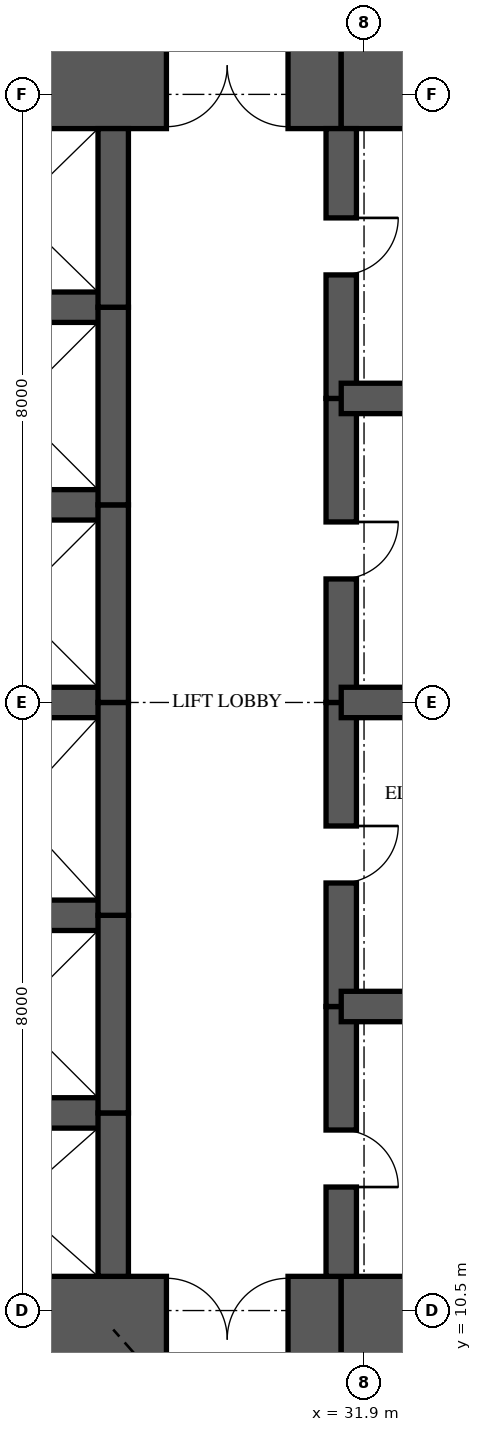
"""IFC4 building model, lengths in metres.
Left out: names, types, materials, properties, quantities, classifications, styles, units other than length and angle.
Written with IfcOpenShell. Run it as: python <this file> out.ifc"""

import sys

from ifc_helpers import new_model, si_unit, direction, frame, frame_2d, origin, place, context, subcontext, project, spatial, rectangle, extrude, element, fill, save


model = new_model("IFC4")
c1 = context("Model", 3, precision=1e-05, world=origin(), true_north=direction((0.0, 1.0)))
c2 = subcontext(c1, "Body", "Model", "MODEL_VIEW")
j1 = project(units=[si_unit("LENGTHUNIT", "METRE"), si_unit("PLANEANGLEUNIT", "RADIAN")], contexts=[c1])
p1 = place(None, origin())
s1 = spatial("IfcSite", under=j1, at=p1, CompositionType="ELEMENT")
p2 = place(p1, origin())
s2 = spatial("IfcBuilding", under=s1, at=p2, CompositionType="ELEMENT")
p3 = place(p2, frame((0.0, 0.0, 74.75)))
s3 = spatial("IfcBuildingStorey", under=s2, at=p3, CompositionType="ELEMENT", Elevation=74.75)
p4 = place(p3, frame((26.0, 10.125, 0.0), z_axis=(0.0, 0.0, 1.0), x_axis=(1.0, 0.0, 0.0)))
e1 = element("IfcWall", 1, at=p4, inside=s3, PredefinedType="SHEAR", context=c2, shape_type="SweptSolid", body=[
    extrude(rectangle(XDim=5.6, YDim=1.65, at=frame_2d((2.8, 0.0))), origin(), (0.0, 0.0, 1.0), 5.0),
])
p5 = place(p4, frame((3.3, 0.0, 0.0)))
e2 = element("IfcOpeningElement", 2, at=p5, cuts=e1, PredefinedType="OPENING", context=c2, shape_type="SweptSolid", body=[
    extrude(rectangle(XDim=1.6, YDim=2.1, at=frame_2d((0.8, 1.05))), frame((0.0, 0.835, 0.0), z_axis=(0.0, -1.0, 0.0), x_axis=(1.0, 0.0, 0.0)), (0.0, 0.0, 1.0), 1.67),
])
for number, where, z_axis, x_axis in (
    (3, (31.6, 10.125, 0.0), (0.0, 0.0, 1.0), (1.0, 0.0, 0.0)),
    (4, (35.9, 26.875, 0.0), (0.0, 0.0, 1.0), (-1.0, 0.0, 0.0)),
):
    element("IfcWall", number, at=place(p3, frame(where, z_axis=z_axis, x_axis=x_axis)), inside=s3, PredefinedType="SHEAR", context=c2, shape_type="SweptSolid", body=[
        extrude(rectangle(XDim=4.3, YDim=1.65, at=frame_2d((2.15, 0.0))), origin(), (0.0, 0.0, 1.0), 5.0),
    ])
p6 = place(p3, frame((31.6, 26.875, 0.0), z_axis=(0.0, 0.0, 1.0), x_axis=(-1.0, 0.0, 0.0)))
e5 = element("IfcWall", 5, at=p6, inside=s3, PredefinedType="SHEAR", context=c2, shape_type="SweptSolid", body=[
    extrude(rectangle(XDim=5.6, YDim=1.65, at=frame_2d((2.8, 0.0))), origin(), (0.0, 0.0, 1.0), 5.0),
])
p7 = place(p6, frame((0.7, 0.0, 0.0)))
e6 = element("IfcOpeningElement", 6, at=p7, cuts=e5, PredefinedType="OPENING", context=c2, shape_type="SweptSolid", body=[
    extrude(rectangle(XDim=1.6, YDim=2.1, at=frame_2d((0.8, 1.05))), frame((0.0, 0.835, 0.0), z_axis=(0.0, -1.0, 0.0), x_axis=(1.0, 0.0, 0.0)), (0.0, 0.0, 1.0), 1.67),
])
p8 = place(p3, frame((28.6, 10.95, 0.0), z_axis=(0.0, 0.0, 1.0), x_axis=(0.0, 1.0, 0.0)))
e7 = element("IfcWall", 7, at=p8, inside=s3, PredefinedType="SHEAR", context=c2, shape_type="SweptSolid", body=[
    extrude(rectangle(XDim=2.15, YDim=0.4, at=frame_2d((1.075, 0.0))), origin(), (0.0, 0.0, 1.0), 5.0),
])
p9 = place(p3, frame((28.6, 13.1, 0.0), z_axis=(0.0, 0.0, 1.0), x_axis=(0.0, 1.0, 0.0)))
e8 = element("IfcWall", 8, at=p9, inside=s3, PredefinedType="SHEAR", context=c2, shape_type="SweptSolid", body=[
    extrude(rectangle(XDim=2.6, YDim=0.4, at=frame_2d((1.3, 0.0))), origin(), (0.0, 0.0, 1.0), 5.0),
])
p10 = place(p3, frame((28.6, 15.7, 0.0), z_axis=(0.0, 0.0, 1.0), x_axis=(0.0, 1.0, 0.0)))
e9 = element("IfcWall", 9, at=p10, inside=s3, PredefinedType="SHEAR", context=c2, shape_type="SweptSolid", body=[
    extrude(rectangle(XDim=2.8, YDim=0.4, at=frame_2d((1.4, 0.0))), origin(), (0.0, 0.0, 1.0), 5.0),
])
p11 = place(p3, frame((28.6, 18.5, 0.0), z_axis=(0.0, 0.0, 1.0), x_axis=(0.0, 1.0, 0.0)))
e10 = element("IfcWall", 10, at=p11, inside=s3, PredefinedType="SHEAR", context=c2, shape_type="SweptSolid", body=[
    extrude(rectangle(XDim=2.6, YDim=0.4, at=frame_2d((1.3, 0.0))), origin(), (0.0, 0.0, 1.0), 5.0),
])
p12 = place(p3, frame((28.6, 21.1, 0.0), z_axis=(0.0, 0.0, 1.0), x_axis=(0.0, 1.0, 0.0)))
e11 = element("IfcWall", 11, at=p12, inside=s3, PredefinedType="SHEAR", context=c2, shape_type="SweptSolid", body=[
    extrude(rectangle(XDim=2.6, YDim=0.4, at=frame_2d((1.3, 0.0))), origin(), (0.0, 0.0, 1.0), 5.0),
])
p13 = place(p3, frame((28.6, 23.7, 0.0), z_axis=(0.0, 0.0, 1.0), x_axis=(0.0, 1.0, 0.0)))
e12 = element("IfcWall", 12, at=p13, inside=s3, PredefinedType="SHEAR", context=c2, shape_type="SweptSolid", body=[
    extrude(rectangle(XDim=2.35, YDim=0.4, at=frame_2d((1.175, 0.0))), origin(), (0.0, 0.0, 1.0), 5.0),
])
p14 = place(p3, frame((31.6, 10.95, 0.0), z_axis=(0.0, 0.0, 1.0), x_axis=(0.0, 1.0, 0.0)))
e13 = element("IfcWall", 13, at=p14, inside=s3, PredefinedType="SHEAR", context=c2, shape_type="SweptSolid", body=[
    extrude(rectangle(XDim=3.55, YDim=0.4, at=frame_2d((1.775, 0.0))), origin(), (0.0, 0.0, 1.0), 5.0),
])
p15 = place(p14, frame((1.175, 0.0, 0.0)))
e14 = element("IfcOpeningElement", 14, at=p15, cuts=e13, PredefinedType="OPENING", context=c2, shape_type="SweptSolid", body=[
    extrude(rectangle(XDim=0.75, YDim=2.1, at=frame_2d((0.375, 1.05))), frame((0.0, 0.21, 0.0), z_axis=(0.0, -1.0, 0.0), x_axis=(1.0, 0.0, 0.0)), (0.0, 0.0, 1.0), 0.42),
])
p16 = place(p3, frame((31.6, 14.5, 0.0), z_axis=(0.0, 0.0, 1.0), x_axis=(0.0, 1.0, 0.0)))
e15 = element("IfcWall", 15, at=p16, inside=s3, PredefinedType="SHEAR", context=c2, shape_type="SweptSolid", body=[
    extrude(rectangle(XDim=4.0, YDim=0.4, at=frame_2d((2.0, 0.0))), origin(), (0.0, 0.0, 1.0), 5.0),
])
p17 = place(p16, frame((1.625, 0.0, 0.0)))
e16 = element("IfcOpeningElement", 16, at=p17, cuts=e15, PredefinedType="OPENING", context=c2, shape_type="SweptSolid", body=[
    extrude(rectangle(XDim=0.75, YDim=2.1, at=frame_2d((0.375, 1.05))), frame((0.0, 0.21, 0.0), z_axis=(0.0, -1.0, 0.0), x_axis=(1.0, 0.0, 0.0)), (0.0, 0.0, 1.0), 0.42),
])
p18 = place(p3, frame((31.6, 18.5, 0.0), z_axis=(0.0, 0.0, 1.0), x_axis=(0.0, 1.0, 0.0)))
e17 = element("IfcWall", 17, at=p18, inside=s3, PredefinedType="SHEAR", context=c2, shape_type="SweptSolid", body=[
    extrude(rectangle(XDim=4.0, YDim=0.4, at=frame_2d((2.0, 0.0))), origin(), (0.0, 0.0, 1.0), 5.0),
])
p19 = place(p18, frame((1.625, 0.0, 0.0)))
e18 = element("IfcOpeningElement", 18, at=p19, cuts=e17, PredefinedType="OPENING", context=c2, shape_type="SweptSolid", body=[
    extrude(rectangle(XDim=0.75, YDim=2.1, at=frame_2d((0.375, 1.05))), frame((0.0, 0.21, 0.0), z_axis=(0.0, -1.0, 0.0), x_axis=(1.0, 0.0, 0.0)), (0.0, 0.0, 1.0), 0.42),
])
p20 = place(p3, frame((31.6, 22.5, 0.0), z_axis=(0.0, 0.0, 1.0), x_axis=(0.0, 1.0, 0.0)))
e19 = element("IfcWall", 19, at=p20, inside=s3, PredefinedType="SHEAR", context=c2, shape_type="SweptSolid", body=[
    extrude(rectangle(XDim=3.55, YDim=0.4, at=frame_2d((1.775, 0.0))), origin(), (0.0, 0.0, 1.0), 5.0),
])
p21 = place(p20, frame((1.625, 0.0, 0.0)))
e20 = element("IfcOpeningElement", 20, at=p21, cuts=e19, PredefinedType="OPENING", context=c2, shape_type="SweptSolid", body=[
    extrude(rectangle(XDim=0.75, YDim=2.1, at=frame_2d((0.375, 1.05))), frame((0.0, 0.21, 0.0), z_axis=(0.0, -1.0, 0.0), x_axis=(1.0, 0.0, 0.0)), (0.0, 0.0, 1.0), 0.42),
])
for number, where, z_axis, x_axis in (
    (21, (26.0, 13.1, 0.0), (0.0, 0.0, 1.0), (1.0, 0.0, 0.0)),
    (22, (26.0, 15.7, 0.0), (0.0, 0.0, 1.0), (1.0, 0.0, 0.0)),
    (23, (26.0, 18.5, 0.0), (0.0, 0.0, 1.0), (1.0, 0.0, 0.0)),
    (24, (26.0, 21.1, 0.0), (0.0, 0.0, 1.0), (1.0, 0.0, 0.0)),
    (25, (26.0, 23.7, 0.0), (0.0, 0.0, 1.0), (1.0, 0.0, 0.0)),
):
    element("IfcWall", number, at=place(p3, frame(where, z_axis=z_axis, x_axis=x_axis)), inside=s3, PredefinedType="SHEAR", context=c2, shape_type="SweptSolid", body=[
        extrude(rectangle(XDim=2.6, YDim=0.4, at=frame_2d((1.3, 0.0))), origin(), (0.0, 0.0, 1.0), 5.0),
    ])
for number, where, z_axis, x_axis in (
    (26, (31.6, 14.5, 0.0), (0.0, 0.0, 1.0), (1.0, 0.0, 0.0)),
    (27, (31.6, 18.5, 0.0), (0.0, 0.0, 1.0), (1.0, 0.0, 0.0)),
    (28, (31.6, 22.5, 0.0), (0.0, 0.0, 1.0), (1.0, 0.0, 0.0)),
):
    element("IfcWall", number, at=place(p3, frame(where, z_axis=z_axis, x_axis=x_axis)), inside=s3, PredefinedType="SHEAR", context=c2, shape_type="SweptSolid", body=[
        extrude(rectangle(XDim=4.3, YDim=0.4, at=frame_2d((2.15, 0.0))), origin(), (0.0, 0.0, 1.0), 5.0),
    ])
p22 = place(p5, origin())
e29 = element("IfcDoor", 29, at=p22, inside=s3, OperationType="DOUBLE_DOOR_SINGLE_SWING", PredefinedType="DOOR", context=c2, shape_type="SweptSolid", body=[
    extrude(rectangle(XDim=1.6, YDim=2.1, at=frame_2d((0.8, 1.05))), frame((0.0, 0.025, 0.0), z_axis=(0.0, -1.0, 0.0), x_axis=(1.0, 0.0, 0.0)), (0.0, 0.0, 1.0), 0.05),
])
fill(e2, e29)
p23 = place(p7, origin())
e30 = element("IfcDoor", 30, at=p23, inside=s3, OperationType="DOUBLE_DOOR_SINGLE_SWING", PredefinedType="DOOR", context=c2, shape_type="SweptSolid", body=[
    extrude(rectangle(XDim=1.6, YDim=2.1, at=frame_2d((0.8, 1.05))), frame((0.0, 0.025, 0.0), z_axis=(0.0, -1.0, 0.0), x_axis=(1.0, 0.0, 0.0)), (0.0, 0.0, 1.0), 0.05),
])
fill(e6, e30)
p24 = place(p15, frame((0.75, 0.0, 0.0), z_axis=(0.0, 0.0, 1.0), x_axis=(-1.0, 0.0, 0.0)))
e31 = element("IfcDoor", 31, at=p24, inside=s3, OperationType="SINGLE_SWING_RIGHT", PredefinedType="DOOR", context=c2, shape_type="SweptSolid", body=[
    extrude(rectangle(XDim=0.75, YDim=2.1, at=frame_2d((0.375, 1.05))), frame((0.0, 0.025, 0.0), z_axis=(0.0, -1.0, 0.0), x_axis=(1.0, 0.0, 0.0)), (0.0, 0.0, 1.0), 0.05),
])
fill(e14, e31)
p25 = place(p17, frame((0.75, 0.0, 0.0), z_axis=(0.0, 0.0, 1.0), x_axis=(-1.0, 0.0, 0.0)))
e32 = element("IfcDoor", 32, at=p25, inside=s3, OperationType="SINGLE_SWING_LEFT", PredefinedType="DOOR", context=c2, shape_type="SweptSolid", body=[
    extrude(rectangle(XDim=0.75, YDim=2.1, at=frame_2d((0.375, 1.05))), frame((0.0, 0.025, 0.0), z_axis=(0.0, -1.0, 0.0), x_axis=(1.0, 0.0, 0.0)), (0.0, 0.0, 1.0), 0.05),
])
fill(e16, e32)
p26 = place(p19, frame((0.75, 0.0, 0.0), z_axis=(0.0, 0.0, 1.0), x_axis=(-1.0, 0.0, 0.0)))
e33 = element("IfcDoor", 33, at=p26, inside=s3, OperationType="SINGLE_SWING_LEFT", PredefinedType="DOOR", context=c2, shape_type="SweptSolid", body=[
    extrude(rectangle(XDim=0.75, YDim=2.1, at=frame_2d((0.375, 1.05))), frame((0.0, 0.025, 0.0), z_axis=(0.0, -1.0, 0.0), x_axis=(1.0, 0.0, 0.0)), (0.0, 0.0, 1.0), 0.05),
])
fill(e18, e33)
p27 = place(p21, frame((0.75, 0.0, 0.0), z_axis=(0.0, 0.0, 1.0), x_axis=(-1.0, 0.0, 0.0)))
e34 = element("IfcDoor", 34, at=p27, inside=s3, OperationType="SINGLE_SWING_LEFT", PredefinedType="DOOR", context=c2, shape_type="SweptSolid", body=[
    extrude(rectangle(XDim=0.75, YDim=2.1, at=frame_2d((0.375, 1.05))), frame((0.0, 0.025, 0.0), z_axis=(0.0, -1.0, 0.0), x_axis=(1.0, 0.0, 0.0)), (0.0, 0.0, 1.0), 0.05),
])
fill(e20, e34)
save(model, sys.argv[1])
